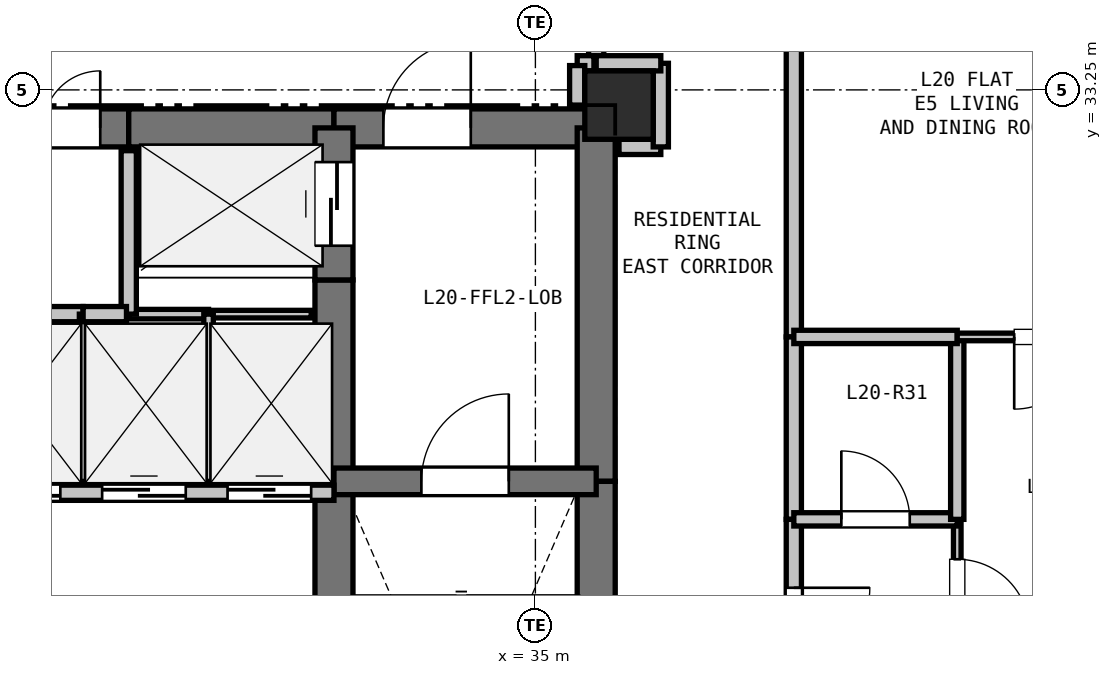
"""IFC4 building model, lengths in metres.
Left out: names, types, materials, properties, quantities, classifications, styles, units other than length and angle.
Written with IfcOpenShell. Run it as: python <this file> out.ifc"""

import sys

from ifc_helpers import new_model, si_unit, direction, frame, frame_2d, origin, origin_2d, place, context, subcontext, project, spatial, rectangle, extrude, element, fill, save


model = new_model("IFC4")
c1 = context("Model", 3, precision=1e-05, world=origin(), true_north=direction((0.0, 1.0)))
c2 = subcontext(c1, "Body", "Model", "MODEL_VIEW")
j1 = project(units=[si_unit("LENGTHUNIT", "METRE"), si_unit("PLANEANGLEUNIT", "RADIAN")], contexts=[c1])
p1 = place(None, origin())
s1 = spatial("IfcSite", under=j1, at=p1, CompositionType="ELEMENT")
p2 = place(p1, origin())
s2 = spatial("IfcBuilding", under=s1, at=p2, CompositionType="ELEMENT")
p3 = place(p2, frame((0.0, 0.0, 76.8)))
s3 = spatial("IfcBuildingStorey", under=s2, at=p3, CompositionType="ELEMENT", Elevation=76.8)
p4 = place(p3, frame((36.1, 33.05, 0.0), z_axis=(0.0, 0.0, 1.0), x_axis=(1.0, 0.0, 0.0)))
e1 = element("IfcColumn", 1, at=p4, inside=s3, PredefinedType="COLUMN", context=c2, shape_type="SweptSolid", body=[
    extrude(rectangle(XDim=0.9, YDim=0.9, at=origin_2d()), origin(), (0.0, 0.0, 1.0), 3.3),
])
p5 = place(p3, frame((27.4, 32.75, 0.0), z_axis=(0.0, 0.0, 1.0), x_axis=(1.0, 0.0, 0.0)))
e2 = element("IfcWall", 2, at=p5, inside=s3, PredefinedType="SHEAR", context=c2, shape_type="SweptSolid", body=[
    extrude(rectangle(XDim=2.25, YDim=0.5, at=frame_2d((1.125, 0.0))), origin(), (0.0, 0.0, 1.0), 3.05),
])
p6 = place(p5, frame((0.375, 0.0, 0.0)))
e3 = element("IfcOpeningElement", 3, at=p6, cuts=e2, PredefinedType="OPENING", context=c2, shape_type="SweptSolid", body=[
    extrude(rectangle(XDim=1.5, YDim=2.2, at=frame_2d((0.75, 1.1))), frame((0.0, 0.26, 0.0), z_axis=(0.0, -1.0, 0.0), x_axis=(1.0, 0.0, 0.0)), (0.0, 0.0, 1.0), 0.52),
])
p7 = place(p3, frame((29.65, 32.75, 0.0), z_axis=(0.0, 0.0, 1.0), x_axis=(1.0, 0.0, 0.0)))
e4 = element("IfcWall", 4, at=p7, inside=s3, PredefinedType="SHEAR", context=c2, shape_type="SweptSolid", body=[
    extrude(rectangle(XDim=2.7, YDim=0.5, at=frame_2d((1.35, 0.0))), origin(), (0.0, 0.0, 1.0), 3.05),
])
p8 = place(p3, frame((32.35, 32.75, 0.0), z_axis=(0.0, 0.0, 1.0), x_axis=(1.0, 0.0, 0.0)))
e5 = element("IfcWall", 5, at=p8, inside=s3, PredefinedType="SHEAR", context=c2, shape_type="SweptSolid", body=[
    extrude(rectangle(XDim=3.45, YDim=0.5, at=frame_2d((1.725, 0.0))), origin(), (0.0, 0.0, 1.0), 3.05),
])
p9 = place(p8, frame((0.65, 0.0, 0.0)))
e6 = element("IfcOpeningElement", 6, at=p9, cuts=e5, PredefinedType="OPENING", context=c2, shape_type="SweptSolid", body=[
    extrude(rectangle(XDim=1.15, YDim=2.15, at=frame_2d((0.575, 1.075))), frame((0.0, 0.26, 0.0), z_axis=(0.0, -1.0, 0.0), x_axis=(1.0, 0.0, 0.0)), (0.0, 0.0, 1.0), 0.52),
])
p10 = place(p3, frame((35.8, 32.75, 0.0), z_axis=(0.0, 0.0, 1.0), x_axis=(0.0, -1.0, 0.0)))
e7 = element("IfcWall", 7, at=p10, inside=s3, PredefinedType="SHEAR", context=c2, shape_type="SweptSolid", body=[
    extrude(rectangle(XDim=4.65, YDim=0.5, at=frame_2d((2.325, 0.0))), origin(), (0.0, 0.0, 1.0), 3.05),
])
p11 = place(p3, frame((35.8, 28.1, 0.0), z_axis=(0.0, 0.0, 1.0), x_axis=(0.0, -1.0, 0.0)))
e8 = element("IfcWall", 8, at=p11, inside=s3, PredefinedType="SHEAR", context=c2, shape_type="SweptSolid", body=[
    extrude(rectangle(XDim=7.35, YDim=0.5, at=frame_2d((3.675, 0.0))), origin(), (0.0, 0.0, 1.0), 3.05),
])
p12 = place(p3, frame((32.35, 25.55, 0.0), z_axis=(0.0, 0.0, 1.0), x_axis=(0.0, 1.0, 0.0)))
e9 = element("IfcWall", 9, at=p12, inside=s3, PredefinedType="SHEAR", context=c2, shape_type="SweptSolid", body=[
    extrude(rectangle(XDim=2.4, YDim=0.5, at=frame_2d((1.2, 0.0))), origin(), (0.0, 0.0, 1.0), 3.05),
])
p13 = place(p3, frame((32.35, 27.95, 0.0), z_axis=(0.0, 0.0, 1.0), x_axis=(0.0, 1.0, 0.0)))
e10 = element("IfcWall", 10, at=p13, inside=s3, PredefinedType="SHEAR", context=c2, shape_type="SweptSolid", body=[
    extrude(rectangle(XDim=2.8, YDim=0.5, at=frame_2d((1.4, 0.0))), origin(), (0.0, 0.0, 1.0), 3.05),
])
p14 = place(p3, frame((32.35, 30.75, 0.0), z_axis=(0.0, 0.0, 1.0), x_axis=(0.0, 1.0, 0.0)))
e11 = element("IfcWall", 11, at=p14, inside=s3, PredefinedType="SHEAR", context=c2, shape_type="SweptSolid", body=[
    extrude(rectangle(XDim=2.0, YDim=0.5, at=frame_2d((1.0, 0.0))), origin(), (0.0, 0.0, 1.0), 3.05),
])
p15 = place(p14, frame((0.45, 0.0, 0.0)))
e12 = element("IfcOpeningElement", 12, at=p15, cuts=e11, PredefinedType="OPENING", context=c2, shape_type="SweptSolid", body=[
    extrude(rectangle(XDim=1.1, YDim=2.15, at=frame_2d((0.55, 1.075))), frame((0.0, 0.26, 0.0), z_axis=(0.0, -1.0, 0.0), x_axis=(1.0, 0.0, 0.0)), (0.0, 0.0, 1.0), 0.52),
])
p16 = place(p3, frame((32.35, 28.1, 0.0), z_axis=(0.0, 0.0, 1.0), x_axis=(1.0, 0.0, 0.0)))
e13 = element("IfcWall", 13, at=p16, inside=s3, PredefinedType="SHEAR", context=c2, shape_type="SweptSolid", body=[
    extrude(rectangle(XDim=3.45, YDim=0.35, at=frame_2d((1.725, 0.0))), origin(), (0.0, 0.0, 1.0), 3.05),
])
p17 = place(p16, frame((1.15, 0.0, 0.0)))
e14 = element("IfcOpeningElement", 14, at=p17, cuts=e13, PredefinedType="OPENING", context=c2, shape_type="SweptSolid", body=[
    extrude(rectangle(XDim=1.15, YDim=2.15, at=frame_2d((0.575, 1.075))), frame((0.0, 0.185, 0.0), z_axis=(0.0, -1.0, 0.0), x_axis=(1.0, 0.0, 0.0)), (0.0, 0.0, 1.0), 0.37),
])
p18 = place(p3, frame((27.4, 27.95, 0.0), z_axis=(0.0, 0.0, 1.0), x_axis=(1.0, 0.0, 0.0)))
e15 = element("IfcWall", 15, at=p18, inside=s3, PredefinedType="PARTITIONING", context=c2, shape_type="SweptSolid", body=[
    extrude(rectangle(XDim=4.95, YDim=0.2, at=frame_2d((2.475, 0.0))), origin(), (0.0, 0.0, 1.0), 3.05),
])
p19 = place(p18, frame((0.25, 0.0, 0.0)))
e16 = element("IfcOpeningElement", 16, at=p19, cuts=e15, PredefinedType="OPENING", context=c2, shape_type="SweptSolid", body=[
    extrude(rectangle(XDim=1.1, YDim=2.15, at=frame_2d((0.55, 1.075))), frame((0.0, 0.11, 0.0), z_axis=(0.0, -1.0, 0.0), x_axis=(1.0, 0.0, 0.0)), (0.0, 0.0, 1.0), 0.22),
])
p20 = place(p18, frame((1.9, 0.0, 0.0)))
e17 = element("IfcOpeningElement", 17, at=p20, cuts=e15, PredefinedType="OPENING", context=c2, shape_type="SweptSolid", body=[
    extrude(rectangle(XDim=1.1, YDim=2.15, at=frame_2d((0.55, 1.075))), frame((0.0, 0.11, 0.0), z_axis=(0.0, -1.0, 0.0), x_axis=(1.0, 0.0, 0.0)), (0.0, 0.0, 1.0), 0.22),
])
p21 = place(p18, frame((3.55, 0.0, 0.0)))
e18 = element("IfcOpeningElement", 18, at=p21, cuts=e15, PredefinedType="OPENING", context=c2, shape_type="SweptSolid", body=[
    extrude(rectangle(XDim=1.1, YDim=2.15, at=frame_2d((0.55, 1.075))), frame((0.0, 0.11, 0.0), z_axis=(0.0, -1.0, 0.0), x_axis=(1.0, 0.0, 0.0)), (0.0, 0.0, 1.0), 0.22),
])
p22 = place(p3, frame((32.05, 30.3, 0.0), z_axis=(0.0, 0.0, 1.0), x_axis=(-1.0, 0.0, 0.0)))
e19 = element("IfcWall", 19, at=p22, inside=s3, PredefinedType="PARTITIONING", context=c2, shape_type="SweptSolid", body=[
    extrude(rectangle(XDim=1.35, YDim=0.1, at=frame_2d((0.675, 0.0))), origin(), (0.0, 0.0, 1.0), 3.05),
])
p23 = place(p3, frame((30.7, 30.3, 0.0), z_axis=(0.0, 0.0, 1.0), x_axis=(-1.0, 0.0, 0.0)))
e20 = element("IfcWall", 20, at=p23, inside=s3, PredefinedType="PARTITIONING", context=c2, shape_type="SweptSolid", body=[
    extrude(rectangle(XDim=1.05, YDim=0.125, at=frame_2d((0.525, 0.0))), origin(), (0.0, 0.0, 1.0), 3.05),
])
p24 = place(p3, frame((29.65, 30.3, 0.0), z_axis=(0.0, 0.0, 1.0), x_axis=(0.0, 1.0, 0.0)))
e21 = element("IfcWall", 21, at=p24, inside=s3, PredefinedType="PARTITIONING", context=c2, shape_type="SweptSolid", body=[
    extrude(rectangle(XDim=2.15, YDim=0.2, at=frame_2d((1.075, 0.0))), origin(), (0.0, 0.0, 1.0), 3.05),
])
p25 = place(p3, frame((27.4, 30.3, 0.0), z_axis=(0.0, 0.0, 1.0), x_axis=(1.0, 0.0, 0.0)))
e22 = element("IfcWall", 22, at=p25, inside=s3, PredefinedType="PARTITIONING", context=c2, shape_type="SweptSolid", body=[
    extrude(rectangle(XDim=1.65, YDim=0.2, at=frame_2d((0.825, 0.0))), origin(), (0.0, 0.0, 1.0), 3.05),
])
p26 = place(p3, frame((29.05, 30.3, 0.0), z_axis=(0.0, 0.0, 1.0), x_axis=(0.0, -1.0, 0.0)))
e23 = element("IfcWall", 23, at=p26, inside=s3, PredefinedType="PARTITIONING", context=c2, shape_type="SweptSolid", body=[
    extrude(rectangle(XDim=2.2, YDim=0.1, at=frame_2d((1.1, 0.0))), origin(), (0.0, 0.0, 1.0), 3.05),
])
p27 = place(p3, frame((29.05, 30.3, 0.0), z_axis=(0.0, 0.0, 1.0), x_axis=(1.0, 0.0, 0.0)))
e24 = element("IfcWall", 24, at=p27, inside=s3, PredefinedType="PARTITIONING", context=c2, shape_type="SweptSolid", body=[
    extrude(rectangle(XDim=0.57, YDim=0.2, at=frame_2d((0.285, 0.0))), origin(), (0.0, 0.0, 1.0), 3.05),
])
p28 = place(p3, frame((30.7, 30.3, 0.0), z_axis=(0.0, 0.0, 1.0), x_axis=(0.0, -1.0, 0.0)))
e25 = element("IfcWall", 25, at=p28, inside=s3, PredefinedType="PARTITIONING", context=c2, shape_type="SweptSolid", body=[
    extrude(rectangle(XDim=2.2, YDim=0.125, at=frame_2d((1.1, 0.0))), origin(), (0.0, 0.0, 1.0), 3.05),
])
p29 = place(p3, frame((35.8, 35.35, 0.0), z_axis=(0.0, 0.0, 1.0), x_axis=(0.0, -1.0, 0.0)))
e26 = element("IfcWall", 26, at=p29, inside=s3, PredefinedType="PARTITIONING", context=c2, shape_type="SweptSolid", body=[
    extrude(rectangle(XDim=1.75, YDim=0.2, at=frame_2d((0.875, 0.0))), origin(), (0.0, 0.0, 1.0), 3.05),
])
p30 = place(p29, frame((0.375, 0.0, 0.0)))
e27 = element("IfcOpeningElement", 27, at=p30, cuts=e26, PredefinedType="OPENING", context=c2, shape_type="SweptSolid", body=[
    extrude(rectangle(XDim=1.0, YDim=2.15, at=frame_2d((0.5, 1.075))), frame((0.0, 0.11, 0.0), z_axis=(0.0, -1.0, 0.0), x_axis=(1.0, 0.0, 0.0)), (0.0, 0.0, 1.0), 0.22),
])
p31 = place(p3, frame((35.77, 33.6, 0.0), z_axis=(0.0, 0.0, 1.0), x_axis=(-1.0, 0.0, 0.0)))
e28 = element("IfcWall", 28, at=p31, inside=s3, PredefinedType="PARTITIONING", context=c2, shape_type="SweptSolid", body=[
    extrude(rectangle(XDim=0.22, YDim=0.2, at=frame_2d((0.11, 0.0))), origin(), (0.0, 0.0, 1.0), 3.05),
])
p32 = place(p3, frame((35.55, 33.57, 0.0), z_axis=(0.0, 0.0, 1.0), x_axis=(0.0, -1.0, 0.0)))
e29 = element("IfcWall", 29, at=p32, inside=s3, PredefinedType="PARTITIONING", context=c2, shape_type="SweptSolid", body=[
    extrude(rectangle(XDim=0.52, YDim=0.2, at=frame_2d((0.26, 0.0))), origin(), (0.0, 0.0, 1.0), 2.498),
])
p33 = place(p3, frame((36.1, 32.5, 0.0), z_axis=(0.0, 0.0, 1.0), x_axis=(1.0, 0.0, 0.0)))
e30 = element("IfcWall", 30, at=p33, inside=s3, PredefinedType="PARTITIONING", context=c2, shape_type="SweptSolid", body=[
    extrude(rectangle(XDim=0.55, YDim=0.2, at=frame_2d((0.275, 0.0))), origin(), (0.0, 0.0, 1.0), 2.498),
])
p34 = place(p3, frame((36.65, 32.5, 0.0), z_axis=(0.0, 0.0, 1.0), x_axis=(0.0, 1.0, 0.0)))
e31 = element("IfcWall", 31, at=p34, inside=s3, PredefinedType="PARTITIONING", context=c2, shape_type="SweptSolid", body=[
    extrude(rectangle(XDim=1.1, YDim=0.2, at=frame_2d((0.55, 0.0))), origin(), (0.0, 0.0, 1.0), 2.423),
])
p35 = place(p3, frame((36.65, 33.6, 0.0), z_axis=(0.0, 0.0, 1.0), x_axis=(-1.0, 0.0, 0.0)))
e32 = element("IfcWall", 32, at=p35, inside=s3, PredefinedType="PARTITIONING", context=c2, shape_type="SweptSolid", body=[
    extrude(rectangle(XDim=0.85, YDim=0.2, at=frame_2d((0.425, 0.0))), origin(), (0.0, 0.0, 1.0), 2.423),
])
p36 = place(p3, frame((38.4, 35.35, 0.0), z_axis=(0.0, 0.0, 1.0), x_axis=(0.0, -1.0, 0.0)))
e33 = element("IfcWall", 33, at=p36, inside=s3, PredefinedType="PARTITIONING", context=c2, shape_type="SweptSolid", body=[
    extrude(rectangle(XDim=5.35, YDim=0.2, at=frame_2d((2.675, 0.0))), origin(), (0.0, 0.0, 1.0), 3.05),
])
p37 = place(p3, frame((38.4, 30.0, 0.0), z_axis=(0.0, 0.0, 1.0), x_axis=(0.0, -1.0, 0.0)))
e34 = element("IfcWall", 34, at=p37, inside=s3, PredefinedType="PARTITIONING", context=c2, shape_type="SweptSolid", body=[
    extrude(rectangle(XDim=2.4, YDim=0.2, at=frame_2d((1.2, 0.0))), origin(), (0.0, 0.0, 1.0), 3.05),
])
p38 = place(p3, frame((38.4, 27.6, 0.0), z_axis=(0.0, 0.0, 1.0), x_axis=(0.0, -1.0, 0.0)))
e35 = element("IfcWall", 35, at=p38, inside=s3, PredefinedType="PARTITIONING", context=c2, shape_type="SweptSolid", body=[
    extrude(rectangle(XDim=2.8, YDim=0.2, at=frame_2d((1.4, 0.0))), origin(), (0.0, 0.0, 1.0), 3.05),
])
p39 = place(p38, frame((0.9, 0.0, 0.0)))
e36 = element("IfcOpeningElement", 36, at=p39, cuts=e35, PredefinedType="OPENING", context=c2, shape_type="SweptSolid", body=[
    extrude(rectangle(XDim=1.0, YDim=2.15, at=frame_2d((0.5, 1.075))), frame((0.0, 0.11, 0.0), z_axis=(0.0, -1.0, 0.0), x_axis=(1.0, 0.0, 0.0)), (0.0, 0.0, 1.0), 0.22),
])
p40 = place(p3, frame((40.55, 27.6, 0.0), z_axis=(0.0, 0.0, 1.0), x_axis=(0.0, -1.0, 0.0)))
e37 = element("IfcWall", 37, at=p40, inside=s3, PredefinedType="PARTITIONING", context=c2, shape_type="SweptSolid", body=[
    extrude(rectangle(XDim=2.0, YDim=0.1, at=frame_2d((1.0, 0.0))), origin(), (0.0, 0.0, 1.0), 3.05),
])
p41 = place(p40, frame((0.525, 0.0, 0.0)))
e38 = element("IfcOpeningElement", 38, at=p41, cuts=e37, PredefinedType="OPENING", context=c2, shape_type="SweptSolid", body=[
    extrude(rectangle(XDim=0.95, YDim=2.1, at=frame_2d((0.475, 1.05))), frame((0.0, 0.06, 0.0), z_axis=(0.0, -1.0, 0.0), x_axis=(1.0, 0.0, 0.0)), (0.0, 0.0, 1.0), 0.12),
])
p42 = place(p3, frame((38.4, 27.6, 0.0), z_axis=(0.0, 0.0, 1.0), x_axis=(1.0, 0.0, 0.0)))
e39 = element("IfcWall", 39, at=p42, inside=s3, PredefinedType="PLUMBINGWALL", context=c2, shape_type="SweptSolid", body=[
    extrude(rectangle(XDim=2.15, YDim=0.175, at=frame_2d((1.075, 0.0))), origin(), (0.0, 0.0, 1.0), 3.05),
])
p43 = place(p42, frame((0.625, 0.0, 0.0)))
e40 = element("IfcOpeningElement", 40, at=p43, cuts=e39, PredefinedType="OPENING", context=c2, shape_type="SweptSolid", body=[
    extrude(rectangle(XDim=0.9, YDim=2.1, at=frame_2d((0.45, 1.05))), frame((0.0, 0.097, 0.0), z_axis=(0.0, -1.0, 0.0), x_axis=(1.0, 0.0, 0.0)), (0.0, 0.0, 1.0), 0.195),
])
p44 = place(p3, frame((40.55, 30.0, 0.0), z_axis=(0.0, 0.0, 1.0), x_axis=(0.0, -1.0, 0.0)))
e41 = element("IfcWall", 41, at=p44, inside=s3, PredefinedType="PLUMBINGWALL", context=c2, shape_type="SweptSolid", body=[
    extrude(rectangle(XDim=2.4, YDim=0.175, at=frame_2d((1.2, 0.0))), origin(), (0.0, 0.0, 1.0), 3.05),
])
p45 = place(p3, frame((38.4, 30.0, 0.0), z_axis=(0.0, 0.0, 1.0), x_axis=(1.0, 0.0, 0.0)))
e42 = element("IfcWall", 42, at=p45, inside=s3, PredefinedType="PLUMBINGWALL", context=c2, shape_type="SweptSolid", body=[
    extrude(rectangle(XDim=2.15, YDim=0.175, at=frame_2d((1.075, 0.0))), origin(), (0.0, 0.0, 1.0), 3.05),
])
p46 = place(p3, frame((42.999, 30.0, 0.0), z_axis=(0.0, 0.0, 1.0), x_axis=(-1.0, 0.0, 0.0)))
e43 = element("IfcWall", 43, at=p46, inside=s3, PredefinedType="PARTITIONING", context=c2, shape_type="SweptSolid", body=[
    extrude(rectangle(XDim=2.448, YDim=0.1, at=frame_2d((1.224, 0.0))), origin(), (0.0, 0.0, 1.0), 2.365),
])
p47 = place(p46, frame((0.749, 0.0, 0.0)))
e44 = element("IfcOpeningElement", 44, at=p47, cuts=e43, PredefinedType="OPENING", context=c2, shape_type="SweptSolid", body=[
    extrude(rectangle(XDim=0.95, YDim=2.1, at=frame_2d((0.475, 1.05))), frame((0.0, 0.06, 0.0), z_axis=(0.0, -1.0, 0.0), x_axis=(1.0, 0.0, 0.0)), (0.0, 0.0, 1.0), 0.12),
])
p48 = place(p19, origin())
e45 = element("IfcDoor", 45, at=p48, inside=s3, OperationType="SLIDING_TO_LEFT", PredefinedType="DOOR", context=c2, shape_type="SweptSolid", body=[
    extrude(rectangle(XDim=1.1, YDim=2.15, at=frame_2d((0.55, 1.075))), frame((0.0, 0.025, 0.0), z_axis=(0.0, -1.0, 0.0), x_axis=(1.0, 0.0, 0.0)), (0.0, 0.0, 1.0), 0.05),
])
fill(e16, e45)
p49 = place(p20, origin())
e46 = element("IfcDoor", 46, at=p49, inside=s3, OperationType="SLIDING_TO_LEFT", PredefinedType="DOOR", context=c2, shape_type="SweptSolid", body=[
    extrude(rectangle(XDim=1.1, YDim=2.15, at=frame_2d((0.55, 1.075))), frame((0.0, 0.025, 0.0), z_axis=(0.0, -1.0, 0.0), x_axis=(1.0, 0.0, 0.0)), (0.0, 0.0, 1.0), 0.05),
])
fill(e17, e46)
p50 = place(p21, origin())
e47 = element("IfcDoor", 47, at=p50, inside=s3, OperationType="SLIDING_TO_LEFT", PredefinedType="DOOR", context=c2, shape_type="SweptSolid", body=[
    extrude(rectangle(XDim=1.1, YDim=2.15, at=frame_2d((0.55, 1.075))), frame((0.0, 0.025, 0.0), z_axis=(0.0, -1.0, 0.0), x_axis=(1.0, 0.0, 0.0)), (0.0, 0.0, 1.0), 0.05),
])
fill(e18, e47)
p51 = place(p15, origin())
e48 = element("IfcDoor", 48, at=p51, inside=s3, OperationType="SLIDING_TO_LEFT", PredefinedType="DOOR", context=c2, shape_type="SweptSolid", body=[
    extrude(rectangle(XDim=1.1, YDim=2.15, at=frame_2d((0.55, 1.075))), frame((0.0, 0.025, 0.0), z_axis=(0.0, -1.0, 0.0), x_axis=(1.0, 0.0, 0.0)), (0.0, 0.0, 1.0), 0.05),
])
fill(e12, e48)
p52 = place(p17, origin())
e49 = element("IfcDoor", 49, at=p52, inside=s3, OperationType="SINGLE_SWING_RIGHT", PredefinedType="DOOR", context=c2, shape_type="SweptSolid", body=[
    extrude(rectangle(XDim=1.15, YDim=2.15, at=frame_2d((0.575, 1.075))), frame((0.0, 0.025, 0.0), z_axis=(0.0, -1.0, 0.0), x_axis=(1.0, 0.0, 0.0)), (0.0, 0.0, 1.0), 0.05),
])
fill(e14, e49)
p53 = place(p9, origin())
e50 = element("IfcDoor", 50, at=p53, inside=s3, OperationType="SINGLE_SWING_RIGHT", PredefinedType="DOOR", context=c2, shape_type="SweptSolid", body=[
    extrude(rectangle(XDim=1.15, YDim=2.15, at=frame_2d((0.575, 1.075))), frame((0.0, 0.025, 0.0), z_axis=(0.0, -1.0, 0.0), x_axis=(1.0, 0.0, 0.0)), (0.0, 0.0, 1.0), 0.05),
])
fill(e6, e50)
p54 = place(p6, origin())
e51 = element("IfcDoor", 51, at=p54, inside=s3, OperationType="DOUBLE_DOOR_SINGLE_SWING", PredefinedType="DOOR", context=c2, shape_type="SweptSolid", body=[
    extrude(rectangle(XDim=1.5, YDim=2.2, at=frame_2d((0.75, 1.1))), frame((0.0, 0.025, 0.0), z_axis=(0.0, -1.0, 0.0), x_axis=(1.0, 0.0, 0.0)), (0.0, 0.0, 1.0), 0.05),
])
fill(e3, e51)
p55 = place(p39, origin())
e52 = element("IfcDoor", 52, at=p55, inside=s3, OperationType="SINGLE_SWING_LEFT", PredefinedType="DOOR", context=c2, shape_type="SweptSolid", body=[
    extrude(rectangle(XDim=1.0, YDim=2.15, at=frame_2d((0.5, 1.075))), frame((0.0, 0.025, 0.0), z_axis=(0.0, -1.0, 0.0), x_axis=(1.0, 0.0, 0.0)), (0.0, 0.0, 1.0), 0.05),
])
fill(e36, e52)
p56 = place(p43, origin())
e53 = element("IfcDoor", 53, at=p56, inside=s3, OperationType="SINGLE_SWING_LEFT", PredefinedType="DOOR", context=c2, shape_type="SweptSolid", body=[
    extrude(rectangle(XDim=0.9, YDim=2.1, at=frame_2d((0.45, 1.05))), frame((0.0, 0.025, 0.0), z_axis=(0.0, -1.0, 0.0), x_axis=(1.0, 0.0, 0.0)), (0.0, 0.0, 1.0), 0.05),
])
fill(e40, e53)
p57 = place(p41, origin())
e54 = element("IfcDoor", 54, at=p57, inside=s3, OperationType="SINGLE_SWING_RIGHT", PredefinedType="DOOR", context=c2, shape_type="SweptSolid", body=[
    extrude(rectangle(XDim=0.95, YDim=2.1, at=frame_2d((0.475, 1.05))), frame((0.0, 0.025, 0.0), z_axis=(0.0, -1.0, 0.0), x_axis=(1.0, 0.0, 0.0)), (0.0, 0.0, 1.0), 0.05),
])
fill(e38, e54)
p58 = place(p47, origin())
e55 = element("IfcDoor", 55, at=p58, inside=s3, OperationType="SINGLE_SWING_RIGHT", PredefinedType="DOOR", context=c2, shape_type="SweptSolid", body=[
    extrude(rectangle(XDim=0.95, YDim=2.1, at=frame_2d((0.475, 1.05))), frame((0.0, 0.025, 0.0), z_axis=(0.0, -1.0, 0.0), x_axis=(1.0, 0.0, 0.0)), (0.0, 0.0, 1.0), 0.05),
])
fill(e44, e55)
save(model, sys.argv[1])
